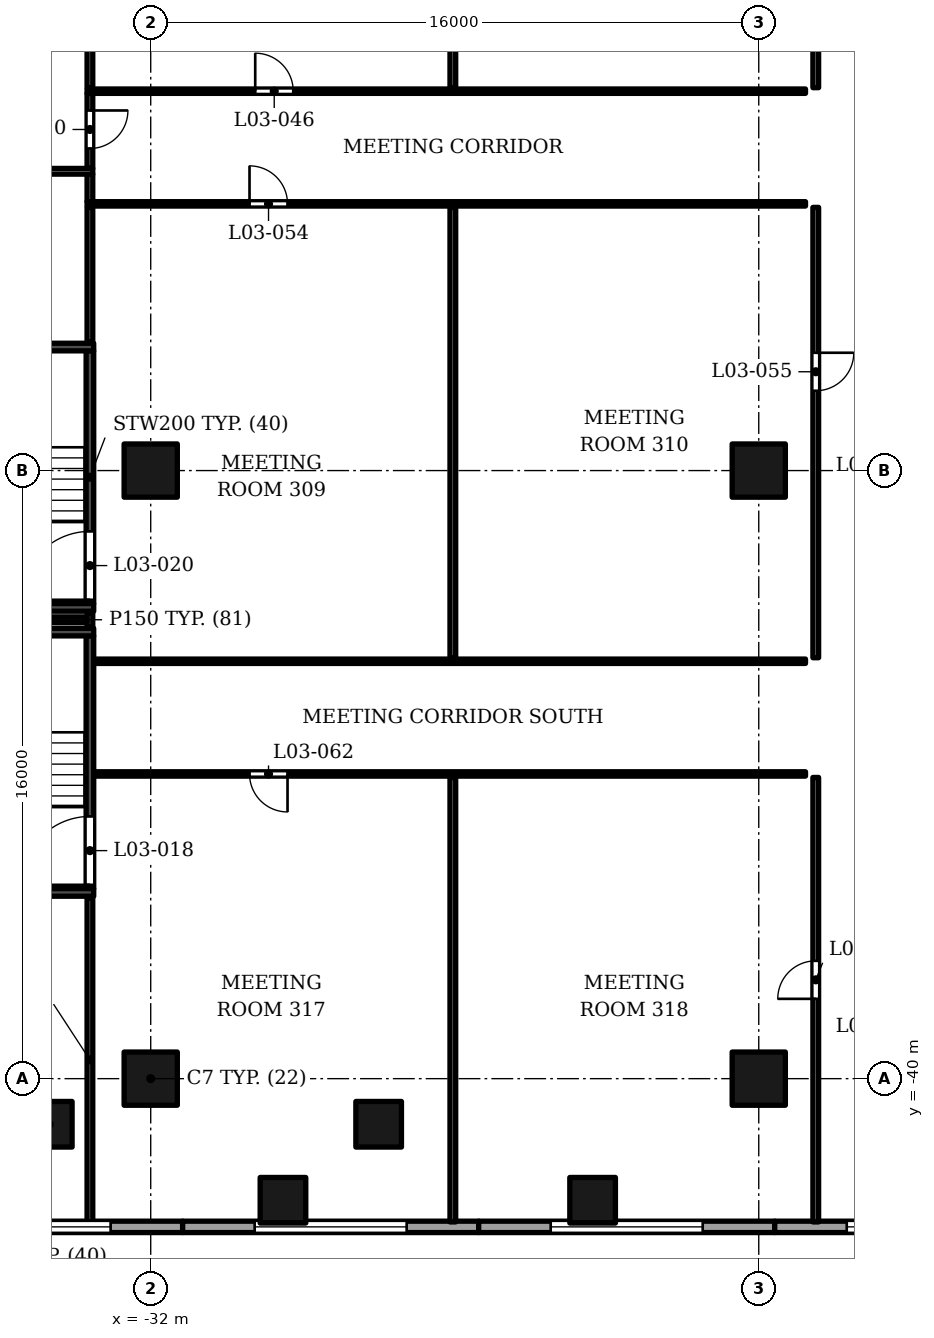
"""IFC4 building model, lengths in metres.
Left out: names, types, materials, properties, quantities, classifications, styles, units other than length and angle.
Written with IfcOpenShell. Run it as: python <this file> out.ifc"""

import sys

from ifc_helpers import new_model, si_unit, direction, frame, frame_2d, origin, origin_2d, place, context, subcontext, project, spatial, rectangle, extrude, element, fill, save


model = new_model("IFC4")
c1 = context("Model", 3, precision=1e-05, world=origin(), true_north=direction((0.0, 1.0)))
c2 = subcontext(c1, "Body", "Model", "MODEL_VIEW")
j1 = project(units=[si_unit("LENGTHUNIT", "METRE"), si_unit("PLANEANGLEUNIT", "RADIAN")], contexts=[c1])
p1 = place(None, origin())
s1 = spatial("IfcSite", under=j1, at=p1, CompositionType="ELEMENT")
p2 = place(p1, origin())
s2 = spatial("IfcBuilding", under=s1, at=p2, CompositionType="ELEMENT")
p3 = place(p2, frame((0.0, 0.0, 29.0)))
s3 = spatial("IfcBuildingStorey", under=s2, at=p3, CompositionType="ELEMENT", Elevation=29.0)
for number, where, z_axis, x_axis in (
    (1, (-32.0, -40.0, 0.0), (0.0, 0.0, 1.0), (1.0, 0.0, 0.0)),
    (2, (-32.0, -24.0, 0.0), (0.0, 0.0, 1.0), (1.0, 0.0, 0.0)),
    (3, (-16.0, -40.0, 0.0), (0.0, 0.0, 1.0), (1.0, 0.0, 0.0)),
    (4, (-16.0, -24.0, 0.0), (0.0, 0.0, 1.0), (1.0, 0.0, 0.0)),
):
    element("IfcColumn", number, at=place(p3, frame(where, z_axis=z_axis, x_axis=x_axis)), inside=s3, PredefinedType="COLUMN", context=c2, shape_type="SweptSolid", body=[
        extrude(rectangle(XDim=1.4, YDim=1.4, at=origin_2d()), origin(), (0.0, 0.0, 1.0), 5.5),
    ])
for number, where, z_axis, x_axis in (
    (5, (-34.669, -41.2, 0.0), (0.0, 0.0, 1.0), (1.0, 0.0, 0.0)),
    (6, (-26.002, -41.2, 0.0), (0.0, 0.0, 1.0), (1.0, 0.0, 0.0)),
    (7, (-20.372, -43.2, 0.0), (0.0, 0.0, 1.0), (1.0, 0.0, 0.0)),
    (8, (-28.52, -43.2, 0.0), (0.0, 0.0, 1.0), (1.0, 0.0, 0.0)),
):
    element("IfcColumn", number, at=place(p3, frame(where, z_axis=z_axis, x_axis=x_axis)), inside=s3, PredefinedType="COLUMN", context=c2, shape_type="SweptSolid", body=[
        extrude(rectangle(XDim=1.2, YDim=1.2, at=origin_2d()), origin(), (0.0, 0.0, 1.0), 5.5),
    ])
p4 = place(p3, frame((-38.95, -43.9, 0.0), z_axis=(0.0, 0.0, 1.0), x_axis=(1.0, 0.0, 0.0)))
e9 = element("IfcWall", 9, at=p4, inside=s3, PredefinedType="SOLIDWALL", context=c2, shape_type="SweptSolid", body=[
    extrude(rectangle(XDim=7.79, YDim=0.3, at=frame_2d((3.895, 0.0))), origin(), (0.0, 0.0, 1.0), 4.1),
])
p5 = place(p4, frame((1.895, 0.0, 1.0)))
e10 = element("IfcOpeningElement", 10, at=p5, cuts=e9, PredefinedType="OPENING", context=c2, shape_type="SweptSolid", body=[
    extrude(rectangle(XDim=4.0, YDim=1.8, at=frame_2d((2.0, 0.9))), frame((0.0, 0.16, 0.0), z_axis=(0.0, -1.0, 0.0), x_axis=(1.0, 0.0, 0.0)), (0.0, 0.0, 1.0), 0.32),
])
p6 = place(p3, frame((-31.16, -43.9, 0.0), z_axis=(0.0, 0.0, 1.0), x_axis=(1.0, 0.0, 0.0)))
e11 = element("IfcWall", 11, at=p6, inside=s3, PredefinedType="SOLIDWALL", context=c2, shape_type="SweptSolid", body=[
    extrude(rectangle(XDim=7.79, YDim=0.3, at=frame_2d((3.895, 0.0))), origin(), (0.0, 0.0, 1.0), 4.1),
])
p7 = place(p6, frame((1.895, 0.0, 1.0)))
e12 = element("IfcOpeningElement", 12, at=p7, cuts=e11, PredefinedType="OPENING", context=c2, shape_type="SweptSolid", body=[
    extrude(rectangle(XDim=4.0, YDim=1.8, at=frame_2d((2.0, 0.9))), frame((0.0, 0.16, 0.0), z_axis=(0.0, -1.0, 0.0), x_axis=(1.0, 0.0, 0.0)), (0.0, 0.0, 1.0), 0.32),
])
p8 = place(p3, frame((-23.37, -43.9, 0.0), z_axis=(0.0, 0.0, 1.0), x_axis=(1.0, 0.0, 0.0)))
e13 = element("IfcWall", 13, at=p8, inside=s3, PredefinedType="SOLIDWALL", context=c2, shape_type="SweptSolid", body=[
    extrude(rectangle(XDim=7.79, YDim=0.3, at=frame_2d((3.895, 0.0))), origin(), (0.0, 0.0, 1.0), 4.1),
])
p9 = place(p8, frame((1.895, 0.0, 1.0)))
e14 = element("IfcOpeningElement", 14, at=p9, cuts=e13, PredefinedType="OPENING", context=c2, shape_type="SweptSolid", body=[
    extrude(rectangle(XDim=4.0, YDim=1.8, at=frame_2d((2.0, 0.9))), frame((0.0, 0.16, 0.0), z_axis=(0.0, -1.0, 0.0), x_axis=(1.0, 0.0, 0.0)), (0.0, 0.0, 1.0), 0.32),
])
p10 = place(p3, frame((-15.58, -43.9, 0.0), z_axis=(0.0, 0.0, 1.0), x_axis=(1.0, 0.0, 0.0)))
e15 = element("IfcWall", 15, at=p10, inside=s3, PredefinedType="SOLIDWALL", context=c2, shape_type="SweptSolid", body=[
    extrude(rectangle(XDim=7.79, YDim=0.3, at=frame_2d((3.895, 0.0))), origin(), (0.0, 0.0, 1.0), 4.1),
])
p11 = place(p10, frame((1.895, 0.0, 1.0)))
e16 = element("IfcOpeningElement", 16, at=p11, cuts=e15, PredefinedType="OPENING", context=c2, shape_type="SweptSolid", body=[
    extrude(rectangle(XDim=4.0, YDim=1.8, at=frame_2d((2.0, 0.9))), frame((0.0, 0.16, 0.0), z_axis=(0.0, -1.0, 0.0), x_axis=(1.0, 0.0, 0.0)), (0.0, 0.0, 1.0), 0.32),
])
for number, where, z_axis, x_axis in (
    (17, (-38.37, -35.1, 0.0), (0.0, 0.0, 1.0), (1.0, 0.0, 0.0)),
    (18, (-38.37, -28.25, 0.0), (0.0, 0.0, 1.0), (1.0, 0.0, 0.0)),
):
    element("IfcWall", number, at=place(p3, frame(where, z_axis=z_axis, x_axis=x_axis)), inside=s3, PredefinedType="SOLIDWALL", context=c2, shape_type="SweptSolid", body=[
        extrude(rectangle(XDim=4.87, YDim=0.2, at=frame_2d((2.435, 0.0))), origin(), (0.0, 0.0, 1.0), 5.05),
    ])
p12 = place(p3, frame((-33.6, -35.0, 0.0), z_axis=(0.0, 0.0, 1.0), x_axis=(0.0, 1.0, 0.0)))
e19 = element("IfcWall", 19, at=p12, inside=s3, PredefinedType="SOLIDWALL", context=c2, shape_type="SweptSolid", body=[
    extrude(rectangle(XDim=6.65, YDim=0.2, at=frame_2d((3.325, 0.0))), origin(), (0.0, 0.0, 1.0), 5.05),
])
p13 = place(p12, frame((0.1, 0.0, 0.0)))
e20 = element("IfcOpeningElement", 20, at=p13, cuts=e19, PredefinedType="OPENING", context=c2, shape_type="SweptSolid", body=[
    extrude(rectangle(XDim=1.8, YDim=2.4, at=frame_2d((0.9, 1.2))), frame((0.0, 0.11, 0.0), z_axis=(0.0, -1.0, 0.0), x_axis=(1.0, 0.0, 0.0)), (0.0, 0.0, 1.0), 0.22),
])
for number, where, z_axis, x_axis in (
    (21, (-38.37, -27.6, 0.0), (0.0, 0.0, 1.0), (1.0, 0.0, 0.0)),
    (22, (-38.37, -20.75, 0.0), (0.0, 0.0, 1.0), (1.0, 0.0, 0.0)),
):
    element("IfcWall", number, at=place(p3, frame(where, z_axis=z_axis, x_axis=x_axis)), inside=s3, PredefinedType="SOLIDWALL", context=c2, shape_type="SweptSolid", body=[
        extrude(rectangle(XDim=4.87, YDim=0.2, at=frame_2d((2.435, 0.0))), origin(), (0.0, 0.0, 1.0), 5.05),
    ])
p14 = place(p3, frame((-33.6, -27.5, 0.0), z_axis=(0.0, 0.0, 1.0), x_axis=(0.0, 1.0, 0.0)))
e23 = element("IfcWall", 23, at=p14, inside=s3, PredefinedType="SOLIDWALL", context=c2, shape_type="SweptSolid", body=[
    extrude(rectangle(XDim=6.65, YDim=0.2, at=frame_2d((3.325, 0.0))), origin(), (0.0, 0.0, 1.0), 5.05),
])
p15 = place(p14, frame((0.1, 0.0, 0.0)))
e24 = element("IfcOpeningElement", 24, at=p15, cuts=e23, PredefinedType="OPENING", context=c2, shape_type="SweptSolid", body=[
    extrude(rectangle(XDim=1.8, YDim=2.4, at=frame_2d((0.9, 1.2))), frame((0.0, 0.11, 0.0), z_axis=(0.0, -1.0, 0.0), x_axis=(1.0, 0.0, 0.0)), (0.0, 0.0, 1.0), 0.22),
])
p16 = place(p3, frame((-33.6, -43.77, 0.0), z_axis=(0.0, 0.0, 1.0), x_axis=(0.0, 1.0, 0.0)))
e25 = element("IfcWall", 25, at=p16, inside=s3, PredefinedType="PARTITIONING", context=c2, shape_type="SweptSolid", body=[
    extrude(rectangle(XDim=8.53, YDim=0.15, at=frame_2d((4.265, 0.0))), origin(), (0.0, 0.0, 1.0), 3.85),
])
p17 = place(p3, frame((-24.05, -43.77, 0.0), z_axis=(0.0, 0.0, 1.0), x_axis=(0.0, 1.0, 0.0)))
e26 = element("IfcWall", 26, at=p17, inside=s3, PredefinedType="PARTITIONING", context=c2, shape_type="SweptSolid", body=[
    extrude(rectangle(XDim=11.695, YDim=0.15, at=frame_2d((5.848, 0.0))), origin(), (0.0, 0.0, 1.0), 3.85),
])
p18 = place(p3, frame((-14.5, -43.77, 0.0), z_axis=(0.0, 0.0, 1.0), x_axis=(0.0, 1.0, 0.0)))
e27 = element("IfcWall", 27, at=p18, inside=s3, PredefinedType="PARTITIONING", context=c2, shape_type="SweptSolid", body=[
    extrude(rectangle(XDim=11.695, YDim=0.15, at=frame_2d((5.848, 0.0))), origin(), (0.0, 0.0, 1.0), 3.85),
])
p19 = place(p18, frame((5.87, 0.0, 0.0)))
e28 = element("IfcOpeningElement", 28, at=p19, cuts=e27, PredefinedType="OPENING", context=c2, shape_type="SweptSolid", body=[
    extrude(rectangle(XDim=1.0, YDim=2.1, at=frame_2d((0.5, 1.05))), frame((0.0, 0.085, 0.0), z_axis=(0.0, -1.0, 0.0), x_axis=(1.0, 0.0, 0.0)), (0.0, 0.0, 1.0), 0.17),
])
p20 = place(p3, frame((-33.46, -31.982, 0.0), z_axis=(0.0, 0.0, 1.0), x_axis=(1.0, 0.0, 0.0)))
e29 = element("IfcWall", 29, at=p20, inside=s3, PredefinedType="PARTITIONING", context=c2, shape_type="SweptSolid", body=[
    extrude(rectangle(XDim=18.69, YDim=0.115, at=frame_2d((9.345, 0.0))), origin(), (0.0, 0.0, 1.0), 3.85),
])
p21 = place(p20, frame((4.06, 0.0, 0.0)))
e30 = element("IfcOpeningElement", 30, at=p21, cuts=e29, PredefinedType="OPENING", context=c2, shape_type="SweptSolid", body=[
    extrude(rectangle(XDim=1.0, YDim=2.1, at=frame_2d((0.5, 1.05))), frame((0.0, 0.067, 0.0), z_axis=(0.0, -1.0, 0.0), x_axis=(1.0, 0.0, 0.0)), (0.0, 0.0, 1.0), 0.135),
])
p22 = place(p3, frame((-33.46, -29.018, 0.0), z_axis=(0.0, 0.0, 1.0), x_axis=(1.0, 0.0, 0.0)))
e31 = element("IfcWall", 31, at=p22, inside=s3, PredefinedType="PARTITIONING", context=c2, shape_type="SweptSolid", body=[
    extrude(rectangle(XDim=18.69, YDim=0.115, at=frame_2d((9.345, 0.0))), origin(), (0.0, 0.0, 1.0), 3.85),
])
p23 = place(p3, frame((-24.05, -28.925, 0.0), z_axis=(0.0, 0.0, 1.0), x_axis=(0.0, 1.0, 0.0)))
e32 = element("IfcWall", 32, at=p23, inside=s3, PredefinedType="PARTITIONING", context=c2, shape_type="SweptSolid", body=[
    extrude(rectangle(XDim=11.85, YDim=0.15, at=frame_2d((5.925, 0.0))), origin(), (0.0, 0.0, 1.0), 3.85),
])
p24 = place(p3, frame((-14.5, -28.925, 0.0), z_axis=(0.0, 0.0, 1.0), x_axis=(0.0, 1.0, 0.0)))
e33 = element("IfcWall", 33, at=p24, inside=s3, PredefinedType="PARTITIONING", context=c2, shape_type="SweptSolid", body=[
    extrude(rectangle(XDim=11.85, YDim=0.15, at=frame_2d((5.925, 0.0))), origin(), (0.0, 0.0, 1.0), 3.85),
])
p25 = place(p24, frame((7.025, 0.0, 0.0)))
e34 = element("IfcOpeningElement", 34, at=p25, cuts=e33, PredefinedType="OPENING", context=c2, shape_type="SweptSolid", body=[
    extrude(rectangle(XDim=1.0, YDim=2.1, at=frame_2d((0.5, 1.05))), frame((0.0, 0.085, 0.0), z_axis=(0.0, -1.0, 0.0), x_axis=(1.0, 0.0, 0.0)), (0.0, 0.0, 1.0), 0.17),
])
p26 = place(p3, frame((-33.6, -28.11, 0.0), z_axis=(0.0, 0.0, 1.0), x_axis=(0.0, 1.0, 0.0)))
e35 = element("IfcWall", 35, at=p26, inside=s3, PredefinedType="PARTITIONING", context=c2, shape_type="SweptSolid", body=[
    extrude(rectangle(XDim=0.37, YDim=0.15, at=frame_2d((0.185, 0.0))), origin(), (0.0, 0.0, 1.0), 5.05),
])
p27 = place(p3, frame((-43.72, -27.925, 0.0), z_axis=(0.0, 0.0, 1.0), x_axis=(1.0, 0.0, 0.0)))
e36 = element("IfcWall", 36, at=p27, inside=s3, PredefinedType="PARTITIONING", context=c2, shape_type="SweptSolid", body=[
    extrude(rectangle(XDim=10.045, YDim=0.15, at=frame_2d((5.022, 0.0))), origin(), (0.0, 0.0, 1.0), 4.15),
])
p28 = place(p3, frame((-33.6, -20.61, 0.0), z_axis=(0.0, 0.0, 1.0), x_axis=(0.0, 1.0, 0.0)))
e37 = element("IfcWall", 37, at=p28, inside=s3, PredefinedType="PARTITIONING", context=c2, shape_type="SweptSolid", body=[
    extrude(rectangle(XDim=3.535, YDim=0.15, at=frame_2d((1.768, 0.0))), origin(), (0.0, 0.0, 1.0), 5.05),
])
p29 = place(p3, frame((-33.675, -16.982, 0.0), z_axis=(0.0, 0.0, 1.0), x_axis=(1.0, 0.0, 0.0)))
e38 = element("IfcWall", 38, at=p29, inside=s3, PredefinedType="PARTITIONING", context=c2, shape_type="SweptSolid", body=[
    extrude(rectangle(XDim=18.905, YDim=0.115, at=frame_2d((9.453, 0.0))), origin(), (0.0, 0.0, 1.0), 3.85),
])
p30 = place(p29, frame((4.275, 0.0, 0.0)))
e39 = element("IfcOpeningElement", 39, at=p30, cuts=e38, PredefinedType="OPENING", context=c2, shape_type="SweptSolid", body=[
    extrude(rectangle(XDim=1.0, YDim=2.1, at=frame_2d((0.5, 1.05))), frame((0.0, 0.067, 0.0), z_axis=(0.0, -1.0, 0.0), x_axis=(1.0, 0.0, 0.0)), (0.0, 0.0, 1.0), 0.135),
])
p31 = place(p3, frame((-33.6, -16.925, 0.0), z_axis=(0.0, 0.0, 1.0), x_axis=(0.0, 1.0, 0.0)))
e40 = element("IfcWall", 40, at=p31, inside=s3, PredefinedType="PARTITIONING", context=c2, shape_type="SweptSolid", body=[
    extrude(rectangle(XDim=0.725, YDim=0.15, at=frame_2d((0.363, 0.0))), origin(), (0.0, 0.0, 1.0), 5.05),
])
p32 = place(p3, frame((-43.72, -16.125, 0.0), z_axis=(0.0, 0.0, 1.0), x_axis=(1.0, 0.0, 0.0)))
e41 = element("IfcWall", 41, at=p32, inside=s3, PredefinedType="PARTITIONING", context=c2, shape_type="SweptSolid", body=[
    extrude(rectangle(XDim=10.195, YDim=0.15, at=frame_2d((5.098, 0.0))), origin(), (0.0, 0.0, 1.0), 4.15),
])
p33 = place(p3, frame((-33.6, -16.05, 0.0), z_axis=(0.0, 0.0, 1.0), x_axis=(0.0, 1.0, 0.0)))
e42 = element("IfcWall", 42, at=p33, inside=s3, PredefinedType="PARTITIONING", context=c2, shape_type="SweptSolid", body=[
    extrude(rectangle(XDim=1.975, YDim=0.15, at=frame_2d((0.988, 0.0))), origin(), (0.0, 0.0, 1.0), 5.05),
])
p34 = place(p33, frame((0.525, 0.0, 0.0)))
e43 = element("IfcOpeningElement", 43, at=p34, cuts=e42, PredefinedType="OPENING", context=c2, shape_type="SweptSolid", body=[
    extrude(rectangle(XDim=1.0, YDim=2.1, at=frame_2d((0.5, 1.05))), frame((0.0, 0.085, 0.0), z_axis=(0.0, -1.0, 0.0), x_axis=(1.0, 0.0, 0.0)), (0.0, 0.0, 1.0), 0.17),
])
p35 = place(p3, frame((-33.675, -14.018, 0.0), z_axis=(0.0, 0.0, 1.0), x_axis=(1.0, 0.0, 0.0)))
e44 = element("IfcWall", 44, at=p35, inside=s3, PredefinedType="PARTITIONING", context=c2, shape_type="SweptSolid", body=[
    extrude(rectangle(XDim=18.905, YDim=0.115, at=frame_2d((9.453, 0.0))), origin(), (0.0, 0.0, 1.0), 3.85),
])
p36 = place(p35, frame((4.425, 0.0, 0.0)))
e45 = element("IfcOpeningElement", 45, at=p36, cuts=e44, PredefinedType="OPENING", context=c2, shape_type="SweptSolid", body=[
    extrude(rectangle(XDim=1.0, YDim=2.1, at=frame_2d((0.5, 1.05))), frame((0.0, 0.067, 0.0), z_axis=(0.0, -1.0, 0.0), x_axis=(1.0, 0.0, 0.0)), (0.0, 0.0, 1.0), 0.135),
])
p37 = place(p3, frame((-33.6, -13.925, 0.0), z_axis=(0.0, 0.0, 1.0), x_axis=(0.0, 1.0, 0.0)))
e46 = element("IfcWall", 46, at=p37, inside=s3, PredefinedType="PARTITIONING", context=c2, shape_type="SweptSolid", body=[
    extrude(rectangle(XDim=2.285, YDim=0.15, at=frame_2d((1.143, 0.0))), origin(), (0.0, 0.0, 1.0), 5.05),
])
p38 = place(p3, frame((-24.05, -13.925, 0.0), z_axis=(0.0, 0.0, 1.0), x_axis=(0.0, 1.0, 0.0)))
e47 = element("IfcWall", 47, at=p38, inside=s3, PredefinedType="PARTITIONING", context=c2, shape_type="SweptSolid", body=[
    extrude(rectangle(XDim=11.85, YDim=0.15, at=frame_2d((5.925, 0.0))), origin(), (0.0, 0.0, 1.0), 3.85),
])
p39 = place(p3, frame((-14.5, -13.925, 0.0), z_axis=(0.0, 0.0, 1.0), x_axis=(0.0, 1.0, 0.0)))
e48 = element("IfcWall", 48, at=p39, inside=s3, PredefinedType="PARTITIONING", context=c2, shape_type="SweptSolid", body=[
    extrude(rectangle(XDim=11.85, YDim=0.15, at=frame_2d((5.925, 0.0))), origin(), (0.0, 0.0, 1.0), 3.85),
])
p40 = place(p39, frame((3.025, 0.0, 0.0)))
e49 = element("IfcOpeningElement", 49, at=p40, cuts=e48, PredefinedType="OPENING", context=c2, shape_type="SweptSolid", body=[
    extrude(rectangle(XDim=1.0, YDim=2.1, at=frame_2d((0.5, 1.05))), frame((0.0, 0.085, 0.0), z_axis=(0.0, -1.0, 0.0), x_axis=(1.0, 0.0, 0.0)), (0.0, 0.0, 1.0), 0.17),
])
p41 = place(p5, origin())
e50 = element("IfcWindow", 50, at=p41, inside=s3, PartitioningType="SINGLE_PANEL", PredefinedType="WINDOW", context=c2, shape_type="SweptSolid", body=[
    extrude(rectangle(XDim=4.0, YDim=1.8, at=frame_2d((2.0, 0.9))), frame((0.0, 0.03, 0.0), z_axis=(0.0, -1.0, 0.0), x_axis=(1.0, 0.0, 0.0)), (0.0, 0.0, 1.0), 0.06),
])
fill(e10, e50)
p42 = place(p7, origin())
e51 = element("IfcWindow", 51, at=p42, inside=s3, PartitioningType="SINGLE_PANEL", PredefinedType="WINDOW", context=c2, shape_type="SweptSolid", body=[
    extrude(rectangle(XDim=4.0, YDim=1.8, at=frame_2d((2.0, 0.9))), frame((0.0, 0.03, 0.0), z_axis=(0.0, -1.0, 0.0), x_axis=(1.0, 0.0, 0.0)), (0.0, 0.0, 1.0), 0.06),
])
fill(e12, e51)
p43 = place(p9, origin())
e52 = element("IfcWindow", 52, at=p43, inside=s3, PartitioningType="SINGLE_PANEL", PredefinedType="WINDOW", context=c2, shape_type="SweptSolid", body=[
    extrude(rectangle(XDim=4.0, YDim=1.8, at=frame_2d((2.0, 0.9))), frame((0.0, 0.03, 0.0), z_axis=(0.0, -1.0, 0.0), x_axis=(1.0, 0.0, 0.0)), (0.0, 0.0, 1.0), 0.06),
])
fill(e14, e52)
p44 = place(p11, origin())
e53 = element("IfcWindow", 53, at=p44, inside=s3, PartitioningType="SINGLE_PANEL", PredefinedType="WINDOW", context=c2, shape_type="SweptSolid", body=[
    extrude(rectangle(XDim=4.0, YDim=1.8, at=frame_2d((2.0, 0.9))), frame((0.0, 0.03, 0.0), z_axis=(0.0, -1.0, 0.0), x_axis=(1.0, 0.0, 0.0)), (0.0, 0.0, 1.0), 0.06),
])
fill(e16, e53)
p45 = place(p13, origin())
e54 = element("IfcDoor", 54, at=p45, inside=s3, OperationType="DOUBLE_DOOR_SINGLE_SWING", PredefinedType="DOOR", context=c2, shape_type="SweptSolid", body=[
    extrude(rectangle(XDim=1.8, YDim=2.4, at=frame_2d((0.9, 1.2))), frame((0.0, 0.025, 0.0), z_axis=(0.0, -1.0, 0.0), x_axis=(1.0, 0.0, 0.0)), (0.0, 0.0, 1.0), 0.05),
])
fill(e20, e54)
p46 = place(p15, origin())
e55 = element("IfcDoor", 55, at=p46, inside=s3, OperationType="DOUBLE_DOOR_SINGLE_SWING", PredefinedType="DOOR", context=c2, shape_type="SweptSolid", body=[
    extrude(rectangle(XDim=1.8, YDim=2.4, at=frame_2d((0.9, 1.2))), frame((0.0, 0.025, 0.0), z_axis=(0.0, -1.0, 0.0), x_axis=(1.0, 0.0, 0.0)), (0.0, 0.0, 1.0), 0.05),
])
fill(e24, e55)
p47 = place(p36, origin())
e56 = element("IfcDoor", 56, at=p47, inside=s3, OperationType="SINGLE_SWING_LEFT", PredefinedType="DOOR", context=c2, shape_type="SweptSolid", body=[
    extrude(rectangle(XDim=1.0, YDim=2.1, at=frame_2d((0.5, 1.05))), frame((0.0, 0.025, 0.0), z_axis=(0.0, -1.0, 0.0), x_axis=(1.0, 0.0, 0.0)), (0.0, 0.0, 1.0), 0.05),
])
fill(e45, e56)
p48 = place(p30, origin())
e57 = element("IfcDoor", 57, at=p48, inside=s3, OperationType="SINGLE_SWING_LEFT", PredefinedType="DOOR", context=c2, shape_type="SweptSolid", body=[
    extrude(rectangle(XDim=1.0, YDim=2.1, at=frame_2d((0.5, 1.05))), frame((0.0, 0.025, 0.0), z_axis=(0.0, -1.0, 0.0), x_axis=(1.0, 0.0, 0.0)), (0.0, 0.0, 1.0), 0.05),
])
fill(e39, e57)
p49 = place(p25, origin())
e58 = element("IfcDoor", 58, at=p49, inside=s3, OperationType="SINGLE_SWING_RIGHT", PredefinedType="DOOR", context=c2, shape_type="SweptSolid", body=[
    extrude(rectangle(XDim=1.0, YDim=2.1, at=frame_2d((0.5, 1.05))), frame((0.0, 0.025, 0.0), z_axis=(0.0, -1.0, 0.0), x_axis=(1.0, 0.0, 0.0)), (0.0, 0.0, 1.0), 0.05),
])
fill(e34, e58)
p50 = place(p21, origin())
e59 = element("IfcDoor", 59, at=p50, inside=s3, OperationType="SINGLE_SWING_RIGHT", PredefinedType="DOOR", context=c2, shape_type="SweptSolid", body=[
    extrude(rectangle(XDim=1.0, YDim=2.1, at=frame_2d((0.5, 1.05))), frame((0.0, 0.025, 0.0), z_axis=(0.0, -1.0, 0.0), x_axis=(1.0, 0.0, 0.0)), (0.0, 0.0, 1.0), 0.05),
])
fill(e30, e59)
p51 = place(p19, origin())
e60 = element("IfcDoor", 60, at=p51, inside=s3, OperationType="SINGLE_SWING_LEFT", PredefinedType="DOOR", context=c2, shape_type="SweptSolid", body=[
    extrude(rectangle(XDim=1.0, YDim=2.1, at=frame_2d((0.5, 1.05))), frame((0.0, 0.025, 0.0), z_axis=(0.0, -1.0, 0.0), x_axis=(1.0, 0.0, 0.0)), (0.0, 0.0, 1.0), 0.05),
])
fill(e28, e60)
p52 = place(p34, origin())
e61 = element("IfcDoor", 61, at=p52, inside=s3, OperationType="SINGLE_SWING_RIGHT", PredefinedType="DOOR", context=c2, shape_type="SweptSolid", body=[
    extrude(rectangle(XDim=1.0, YDim=2.1, at=frame_2d((0.5, 1.05))), frame((0.0, 0.025, 0.0), z_axis=(0.0, -1.0, 0.0), x_axis=(1.0, 0.0, 0.0)), (0.0, 0.0, 1.0), 0.05),
])
fill(e43, e61)
save(model, sys.argv[1])
